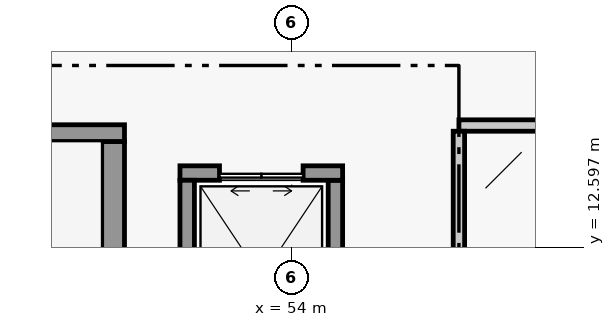
"""IFC4 building model, lengths in metres.
Left out: names, types, materials, properties, quantities, classifications, styles, units other than length and angle.
Written with IfcOpenShell. Run it as: python <this file> out.ifc"""

import sys

from ifc_helpers import new_model, si_unit, direction, frame, frame_2d, origin, place, context, subcontext, project, spatial, rectangle, extrude, element, fill, save


model = new_model("IFC4")
c1 = context("Model", 3, precision=1e-05, world=origin(), true_north=direction((0.0, 1.0)))
c2 = subcontext(c1, "Body", "Model", "MODEL_VIEW")
j1 = project(units=[si_unit("LENGTHUNIT", "METRE"), si_unit("PLANEANGLEUNIT", "RADIAN")], contexts=[c1])
p1 = place(None, origin())
s1 = spatial("IfcSite", under=j1, at=p1, CompositionType="ELEMENT")
p2 = place(p1, origin())
s2 = spatial("IfcBuilding", under=s1, at=p2, CompositionType="ELEMENT")
p3 = place(p2, frame((0.0, 0.0, 4.8)))
s3 = spatial("IfcBuildingStorey", under=s2, at=p3, CompositionType="ELEMENT", Elevation=4.8)
p4 = place(p3, frame((51.65, 9.8, 0.0), z_axis=(0.0, 0.0, 1.0), x_axis=(0.0, 1.0, 0.0)))
e1 = element("IfcWall", 1, at=p4, inside=s3, PredefinedType="SHEAR", context=c2, shape_type="SweptSolid", body=[
    extrude(rectangle(XDim=4.19, YDim=0.3, at=frame_2d((2.095, 0.0))), origin(), (0.0, 0.0, 1.0), 3.94),
])
p5 = place(p3, frame((51.8, 14.1, 0.0), z_axis=(0.0, 0.0, 1.0), x_axis=(-1.0, 0.0, 0.0)))
e2 = element("IfcWall", 2, at=p5, inside=s3, PredefinedType="SOLIDWALL", context=c2, shape_type="SweptSolid", body=[
    extrude(rectangle(XDim=9.22, YDim=0.22, at=frame_2d((4.61, 0.0))), origin(), (0.0, 0.0, 1.0), 3.94),
])
p6 = place(p3, frame((54.575, 10.92, 0.0), z_axis=(0.0, 0.0, 1.0), x_axis=(0.0, 1.0, 0.0)))
e3 = element("IfcWall", 3, at=p6, inside=s3, PredefinedType="SOLIDWALL", context=c2, shape_type="SweptSolid", body=[
    extrude(rectangle(XDim=2.56, YDim=0.19, at=frame_2d((1.28, 0.0))), origin(), (0.0, 0.0, 1.0), 3.94),
])
p7 = place(p3, frame((54.67, 13.575, 0.0), z_axis=(0.0, 0.0, 1.0), x_axis=(-1.0, 0.0, 0.0)))
e4 = element("IfcWall", 4, at=p7, inside=s3, PredefinedType="SOLIDWALL", context=c2, shape_type="SweptSolid", body=[
    extrude(rectangle(XDim=2.14, YDim=0.19, at=frame_2d((1.07, 0.0))), origin(), (0.0, 0.0, 1.0), 3.94),
])
p8 = place(p7, frame((0.52, 0.0, 0.0)))
e5 = element("IfcOpeningElement", 5, at=p8, cuts=e4, PredefinedType="OPENING", context=c2, shape_type="SweptSolid", body=[
    extrude(rectangle(XDim=1.1, YDim=2.2, at=frame_2d((0.55, 1.1))), frame((0.0, 0.11, 0.0), z_axis=(0.0, -1.0, 0.0), x_axis=(1.0, 0.0, 0.0)), (0.0, 0.0, 1.0), 0.22),
])
p9 = place(p3, frame((52.625, 13.48, 0.0), z_axis=(0.0, 0.0, 1.0), x_axis=(0.0, -1.0, 0.0)))
e6 = element("IfcWall", 6, at=p9, inside=s3, PredefinedType="SOLIDWALL", context=c2, shape_type="SweptSolid", body=[
    extrude(rectangle(XDim=2.56, YDim=0.19, at=frame_2d((1.28, 0.0))), origin(), (0.0, 0.0, 1.0), 3.94),
])
p10 = place(p3, frame((56.2, 14.2, 0.0), z_axis=(0.0, 0.0, 1.0), x_axis=(1.0, 0.0, 0.0)))
e7 = element("IfcWall", 7, at=p10, inside=s3, PredefinedType="PLUMBINGWALL", context=c2, shape_type="SweptSolid", body=[
    extrude(rectangle(XDim=12.18, YDim=0.15, at=frame_2d((6.09, 0.0))), origin(), (0.0, 0.0, 1.0), 3.94),
])
p11 = place(p10, frame((5.57, 0.0, 0.0)))
e8 = element("IfcOpeningElement", 8, at=p11, cuts=e7, PredefinedType="OPENING", context=c2, shape_type="SweptSolid", body=[
    extrude(rectangle(XDim=0.95, YDim=2.1, at=frame_2d((0.475, 1.05))), frame((0.0, 0.09, 0.0), z_axis=(0.0, -1.0, 0.0), x_axis=(1.0, 0.0, 0.0)), (0.0, 0.0, 1.0), 0.18),
])
p12 = place(p3, frame((56.2, 0.14, 0.0), z_axis=(0.0, 0.0, 1.0), x_axis=(0.0, 1.0, 0.0)))
e9 = element("IfcWall", 9, at=p12, inside=s3, PredefinedType="PLUMBINGWALL", context=c2, shape_type="SweptSolid", body=[
    extrude(rectangle(XDim=13.985, YDim=0.15, at=frame_2d((6.993, 0.0))), origin(), (0.0, 0.0, 1.0), 3.94),
])
p13 = place(p8, origin())
e10 = element("IfcDoor", 10, at=p13, inside=s3, OperationType="DOUBLE_DOOR_SLIDING", PredefinedType="DOOR", context=c2, shape_type="SweptSolid", body=[
    extrude(rectangle(XDim=1.1, YDim=2.2, at=frame_2d((0.55, 1.1))), frame((0.0, 0.025, 0.0), z_axis=(0.0, -1.0, 0.0), x_axis=(1.0, 0.0, 0.0)), (0.0, 0.0, 1.0), 0.05),
])
fill(e5, e10)
save(model, sys.argv[1])
